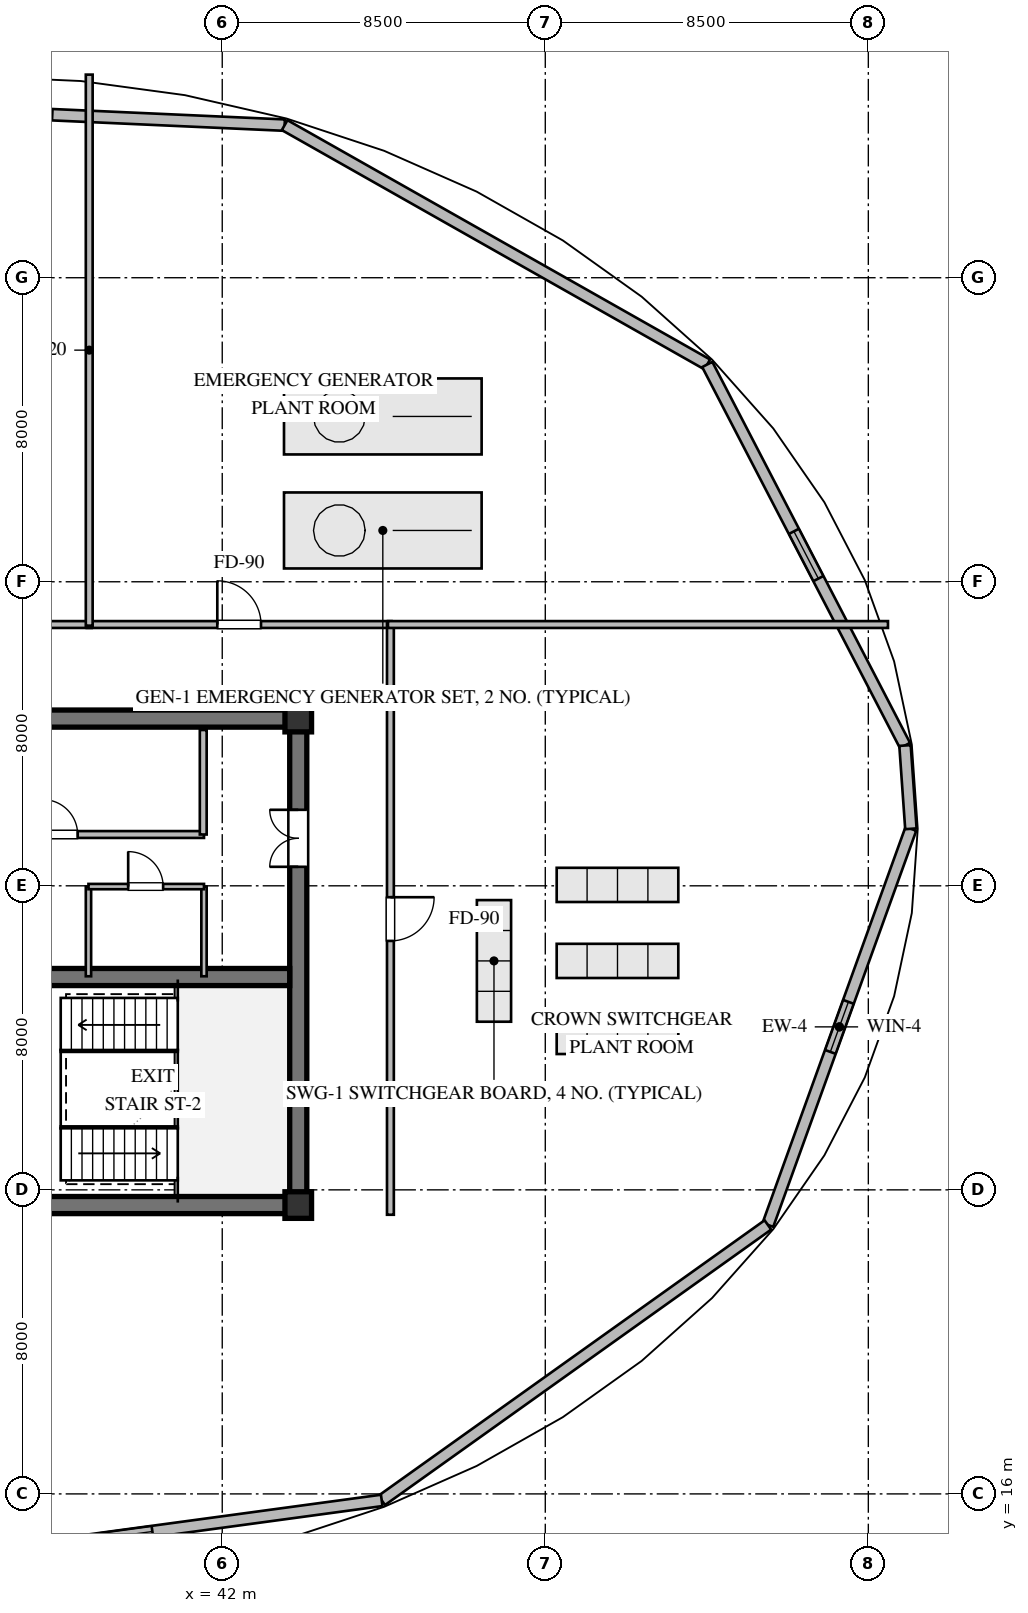
"""IFC4 building model, lengths in metres.
Left out: names, types, materials, properties, quantities, classifications, styles, units other than length and angle.
Written with IfcOpenShell. Run it as: python <this file> out.ifc"""

import sys

from ifc_helpers import new_model, si_unit, direction, frame, frame_2d, origin, origin_2d, place, context, subcontext, project, spatial, rectangle, extrude, element, fill, save


model = new_model("IFC4")
c1 = context("Model", 3, precision=1e-05, world=origin(), true_north=direction((0.0, 1.0)))
c2 = subcontext(c1, "Body", "Model", "MODEL_VIEW")
j1 = project(units=[si_unit("LENGTHUNIT", "METRE"), si_unit("PLANEANGLEUNIT", "RADIAN")], contexts=[c1])
p1 = place(None, origin())
s1 = spatial("IfcSite", under=j1, at=p1, CompositionType="ELEMENT")
p2 = place(p1, origin())
s2 = spatial("IfcBuilding", under=s1, at=p2, CompositionType="ELEMENT")
p3 = place(p2, frame((0.0, 0.0, 304.8)))
s3 = spatial("IfcBuildingStorey", under=s2, at=p3, CompositionType="ELEMENT", Elevation=304.8)
for number, where, z_axis, x_axis in (
    (1, (21.775, 23.6, 0.0), (0.0, 0.0, 1.0), (1.0, 0.0, 0.0)),
    (2, (21.775, 36.4, 0.0), (0.0, 0.0, 1.0), (1.0, 0.0, 0.0)),
):
    element("IfcWall", number, at=place(p3, frame(where, z_axis=z_axis, x_axis=x_axis)), inside=s3, PredefinedType="SHEAR", context=c2, shape_type="SweptSolid", body=[
        extrude(rectangle(XDim=22.45, YDim=0.45, at=frame_2d((11.225, 0.0))), origin(), (0.0, 0.0, 1.0), 3.72),
    ])
p4 = place(p3, frame((44.0, 23.825, 0.0), z_axis=(0.0, 0.0, 1.0), x_axis=(0.0, 1.0, 0.0)))
e3 = element("IfcWall", 3, at=p4, inside=s3, PredefinedType="SHEAR", context=c2, shape_type="SweptSolid", body=[
    extrude(rectangle(XDim=12.35, YDim=0.45, at=frame_2d((6.175, 0.0))), origin(), (0.0, 0.0, 1.0), 3.72),
])
p5 = place(p4, frame((8.675, 0.0, 0.0)))
e4 = element("IfcOpeningElement", 4, at=p5, cuts=e3, PredefinedType="OPENING", context=c2, shape_type="SweptSolid", body=[
    extrude(rectangle(XDim=1.5, YDim=2.15, at=frame_2d((0.75, 1.075))), frame((0.0, 0.235, 0.0), z_axis=(0.0, -1.0, 0.0), x_axis=(1.0, 0.0, 0.0)), (0.0, 0.0, 1.0), 0.47),
])
p6 = place(p3, frame((22.225, 29.6, 0.0), z_axis=(0.0, 0.0, 1.0), x_axis=(1.0, 0.0, 0.0)))
e5 = element("IfcWall", 5, at=p6, inside=s3, PredefinedType="SHEAR", context=c2, shape_type="SweptSolid", body=[
    extrude(rectangle(XDim=21.55, YDim=0.45, at=frame_2d((10.775, 0.0))), origin(), (0.0, 0.0, 1.0), 3.72),
])
p7 = place(p6, frame((12.225, 0.0, 0.0)))
e6 = element("IfcOpeningElement", 6, at=p7, cuts=e5, PredefinedType="OPENING", context=c2, shape_type="SweptSolid", body=[
    extrude(rectangle(XDim=1.15, YDim=2.1, at=frame_2d((0.575, 1.05))), frame((0.0, 0.235, 0.0), z_axis=(0.0, -1.0, 0.0), x_axis=(1.0, 0.0, 0.0)), (0.0, 0.0, 1.0), 0.47),
])
for number, where, z_axis, x_axis in (
    (7, (44.0, 23.6, 0.0), (0.0, 0.0, 1.0), (1.0, 0.0, 0.0)),
    (8, (44.0, 36.4, 0.0), (0.0, 0.0, 1.0), (1.0, 0.0, 0.0)),
):
    element("IfcColumn", number, at=place(p3, frame(where, z_axis=z_axis, x_axis=x_axis)), inside=s3, PredefinedType="COLUMN", context=c2, shape_type="SweptSolid", body=[
        extrude(rectangle(XDim=0.7, YDim=0.7, at=origin_2d()), origin(), (0.0, 0.0, 1.0), 4.0),
    ])
p8 = place(p3, frame((60.12, 33.5, 0.0), z_axis=(0.0, 0.0, 1.0), x_axis=(-0.339587618367, -0.940574425259, 0.0)))
e9 = element("IfcWall", 9, at=p8, inside=s3, PredefinedType="STANDARD", context=c2, shape_type="SweptSolid", body=[
    extrude(rectangle(XDim=11.082, YDim=0.3, at=frame_2d((5.541, 0.0))), origin(), (0.0, 0.0, 1.0), 3.72),
])
p9 = place(p8, frame((4.841, 0.0, 1.2)))
e10 = element("IfcOpeningElement", 10, at=p9, cuts=e9, PredefinedType="OPENING", context=c2, shape_type="SweptSolid", body=[
    extrude(rectangle(XDim=1.4, YDim=1.2, at=frame_2d((0.7, 0.6))), frame((0.0, 0.16, 0.0), z_axis=(0.0, -1.0, 0.0), x_axis=(1.0, 0.0, 0.0)), (0.0, 0.0, 1.0), 0.32),
])
p10 = place(p3, frame((56.357, 23.077, 0.0), z_axis=(0.0, 0.0, 1.0), x_axis=(-0.814111303181, -0.580708865123, 0.0)))
e11 = element("IfcWall", 11, at=p10, inside=s3, PredefinedType="STANDARD", context=c2, shape_type="SweptSolid", body=[
    extrude(rectangle(XDim=12.481, YDim=0.3, at=frame_2d((6.24, 0.0))), origin(), (0.0, 0.0, 1.0), 3.72),
])
p11 = place(p3, frame((46.196, 15.829, 0.0), z_axis=(0.0, 0.0, 1.0), x_axis=(-0.990927056791, -0.134400774248, 0.0)))
e12 = element("IfcWall", 12, at=p11, inside=s3, PredefinedType="STANDARD", context=c2, shape_type="SweptSolid", body=[
    extrude(rectangle(XDim=13.58, YDim=0.3, at=frame_2d((6.79, 0.0))), origin(), (0.0, 0.0, 1.0), 3.72),
])
p12 = place(p11, frame((6.09, 0.0, 1.2)))
e13 = element("IfcOpeningElement", 13, at=p12, cuts=e12, PredefinedType="OPENING", context=c2, shape_type="SweptSolid", body=[
    extrude(rectangle(XDim=1.4, YDim=1.2, at=frame_2d((0.7, 0.6))), frame((0.0, 0.16, 0.0), z_axis=(0.0, -1.0, 0.0), x_axis=(1.0, 0.0, 0.0)), (0.0, 0.0, 1.0), 0.32),
])
p13 = place(p3, frame((30.014, 52.626, 0.0), z_axis=(0.0, 0.0, 1.0), x_axis=(0.998996211569, -0.04479474602, 0.0)))
e14 = element("IfcWall", 14, at=p13, inside=s3, PredefinedType="STANDARD", context=c2, shape_type="SweptSolid", body=[
    extrude(rectangle(XDim=13.642, YDim=0.3, at=frame_2d((6.821, 0.0))), origin(), (0.0, 0.0, 1.0), 3.72),
])
p14 = place(p13, frame((6.121, 0.0, 1.2)))
e15 = element("IfcOpeningElement", 15, at=p14, cuts=e14, PredefinedType="OPENING", context=c2, shape_type="SweptSolid", body=[
    extrude(rectangle(XDim=1.4, YDim=1.2, at=frame_2d((0.7, 0.6))), frame((0.0, 0.16, 0.0), z_axis=(0.0, -1.0, 0.0), x_axis=(1.0, 0.0, 0.0)), (0.0, 0.0, 1.0), 0.32),
])
p15 = place(p3, frame((43.642, 52.015, 0.0), z_axis=(0.0, 0.0, 1.0), x_axis=(0.870169378253, -0.492752730232, 0.0)))
e16 = element("IfcWall", 16, at=p15, inside=s3, PredefinedType="STANDARD", context=c2, shape_type="SweptSolid", body=[
    extrude(rectangle(XDim=12.779, YDim=0.3, at=frame_2d((6.39, 0.0))), origin(), (0.0, 0.0, 1.0), 3.72),
])
p16 = place(p3, frame((54.762, 45.718, 0.0), z_axis=(0.0, 0.0, 1.0), x_axis=(0.460623742834, -0.8875954977, 0.0)))
e17 = element("IfcWall", 17, at=p16, inside=s3, PredefinedType="STANDARD", context=c2, shape_type="SweptSolid", body=[
    extrude(rectangle(XDim=11.296, YDim=0.3, at=frame_2d((5.648, 0.0))), origin(), (0.0, 0.0, 1.0), 3.72),
])
p17 = place(p16, frame((4.948, 0.0, 1.2)))
e18 = element("IfcOpeningElement", 18, at=p17, cuts=e17, PredefinedType="OPENING", context=c2, shape_type="SweptSolid", body=[
    extrude(rectangle(XDim=1.4, YDim=1.2, at=frame_2d((0.7, 0.6))), frame((0.0, 0.16, 0.0), z_axis=(0.0, -1.0, 0.0), x_axis=(1.0, 0.0, 0.0)), (0.0, 0.0, 1.0), 0.32),
])
p18 = place(p3, frame((59.965, 35.692, 0.0), z_axis=(0.0, 0.0, 1.0), x_axis=(0.070552198309, -0.997508088846, 0.0)))
e19 = element("IfcWall", 19, at=p18, inside=s3, PredefinedType="STANDARD", context=c2, shape_type="SweptSolid", body=[
    extrude(rectangle(XDim=2.197, YDim=0.3, at=frame_2d((1.099, 0.0))), origin(), (0.0, 0.0, 1.0), 3.72),
])
p19 = place(p3, frame((33.98, 33.35, 0.0), z_axis=(0.0, 0.0, 1.0), x_axis=(1.0, 0.0, 0.0)))
e20 = element("IfcWall", 20, at=p19, inside=s3, PredefinedType="PARTITIONING", context=c2, shape_type="SweptSolid", body=[
    extrude(rectangle(XDim=7.54, YDim=0.18, at=frame_2d((3.77, 0.0))), origin(), (0.0, 0.0, 1.0), 3.72),
])
p20 = place(p19, frame((3.295, 0.0, 0.0)))
e21 = element("IfcOpeningElement", 21, at=p20, cuts=e20, PredefinedType="OPENING", context=c2, shape_type="SweptSolid", body=[
    extrude(rectangle(XDim=0.92, YDim=2.1, at=frame_2d((0.46, 1.05))), frame((0.0, 0.1, 0.0), z_axis=(0.0, -1.0, 0.0), x_axis=(1.0, 0.0, 0.0)), (0.0, 0.0, 1.0), 0.2),
])
p21 = place(p3, frame((41.5, 33.35, 0.0), z_axis=(0.0, 0.0, 1.0), x_axis=(0.0, 1.0, 0.0)))
e22 = element("IfcWall", 22, at=p21, inside=s3, PredefinedType="PARTITIONING", context=c2, shape_type="SweptSolid", body=[
    extrude(rectangle(XDim=2.75, YDim=0.18, at=frame_2d((1.375, 0.0))), origin(), (0.0, 0.0, 1.0), 3.72),
])
for number, where, z_axis, x_axis in (
    (23, (38.48, 29.62, 0.0), (0.0, 0.0, 1.0), (0.0, 1.0, 0.0)),
    (24, (41.52, 29.62, 0.0), (0.0, 0.0, 1.0), (0.0, 1.0, 0.0)),
):
    element("IfcWall", number, at=place(p3, frame(where, z_axis=z_axis, x_axis=x_axis)), inside=s3, PredefinedType="PARTITIONING", context=c2, shape_type="SweptSolid", body=[
        extrude(rectangle(XDim=2.36, YDim=0.14, at=frame_2d((1.18, 0.0))), origin(), (0.0, 0.0, 1.0), 3.72),
    ])
p22 = place(p3, frame((38.48, 31.98, 0.0), z_axis=(0.0, 0.0, 1.0), x_axis=(1.0, 0.0, 0.0)))
e25 = element("IfcWall", 25, at=p22, inside=s3, PredefinedType="PARTITIONING", context=c2, shape_type="SweptSolid", body=[
    extrude(rectangle(XDim=3.04, YDim=0.14, at=frame_2d((1.52, 0.0))), origin(), (0.0, 0.0, 1.0), 3.72),
])
p23 = place(p22, frame((1.045, 0.0, 0.0)))
e26 = element("IfcOpeningElement", 26, at=p23, cuts=e25, PredefinedType="OPENING", context=c2, shape_type="SweptSolid", body=[
    extrude(rectangle(XDim=0.92, YDim=2.1, at=frame_2d((0.46, 1.05))), frame((0.0, 0.08, 0.0), z_axis=(0.0, -1.0, 0.0), x_axis=(1.0, 0.0, 0.0)), (0.0, 0.0, 1.0), 0.16),
])
p24 = place(p3, frame((21.745, 38.875, 0.0), z_axis=(0.0, 0.0, 1.0), x_axis=(1.0, 0.0, 0.0)))
e27 = element("IfcWall", 27, at=p24, inside=s3, PredefinedType="PARTITIONING", context=c2, shape_type="SweptSolid", body=[
    extrude(rectangle(XDim=16.82, YDim=0.18, at=frame_2d((8.41, 0.0))), origin(), (0.0, 0.0, 1.0), 3.72),
])
p25 = place(p24, frame((7.835, 0.0, 0.0)))
e28 = element("IfcOpeningElement", 28, at=p25, cuts=e27, PredefinedType="OPENING", context=c2, shape_type="SweptSolid", body=[
    extrude(rectangle(XDim=1.15, YDim=2.1, at=frame_2d((0.575, 1.05))), frame((0.0, 0.1, 0.0), z_axis=(0.0, -1.0, 0.0), x_axis=(1.0, 0.0, 0.0)), (0.0, 0.0, 1.0), 0.2),
])
p26 = place(p3, frame((38.435, 38.875, 0.0), z_axis=(0.0, 0.0, 1.0), x_axis=(1.0, 0.0, 0.0)))
e29 = element("IfcWall", 29, at=p26, inside=s3, PredefinedType="PARTITIONING", context=c2, shape_type="SweptSolid", body=[
    extrude(rectangle(XDim=8.02, YDim=0.18, at=frame_2d((4.01, 0.0))), origin(), (0.0, 0.0, 1.0), 3.72),
])
p27 = place(p26, frame((3.435, 0.0, 0.0)))
e30 = element("IfcOpeningElement", 30, at=p27, cuts=e29, PredefinedType="OPENING", context=c2, shape_type="SweptSolid", body=[
    extrude(rectangle(XDim=1.15, YDim=2.1, at=frame_2d((0.575, 1.05))), frame((0.0, 0.1, 0.0), z_axis=(0.0, -1.0, 0.0), x_axis=(1.0, 0.0, 0.0)), (0.0, 0.0, 1.0), 0.2),
])
p28 = place(p3, frame((46.425, 38.905, 0.0), z_axis=(0.0, 0.0, 1.0), x_axis=(0.0, -1.0, 0.0)))
e31 = element("IfcWall", 31, at=p28, inside=s3, PredefinedType="PARTITIONING", context=c2, shape_type="SweptSolid", body=[
    extrude(rectangle(XDim=15.56, YDim=0.18, at=frame_2d((7.78, 0.0))), origin(), (0.0, 0.0, 1.0), 3.72),
])
p29 = place(p28, frame((7.205, 0.0, 0.0)))
e32 = element("IfcOpeningElement", 32, at=p29, cuts=e31, PredefinedType="OPENING", context=c2, shape_type="SweptSolid", body=[
    extrude(rectangle(XDim=1.15, YDim=2.1, at=frame_2d((0.575, 1.05))), frame((0.0, 0.1, 0.0), z_axis=(0.0, -1.0, 0.0), x_axis=(1.0, 0.0, 0.0)), (0.0, 0.0, 1.0), 0.2),
])
p30 = place(p3, frame((38.5, 53.344, 0.0), z_axis=(0.0, 0.0, 1.0), x_axis=(0.0, -1.0, 0.0)))
e33 = element("IfcWall", 33, at=p30, inside=s3, PredefinedType="PARTITIONING", context=c2, shape_type="SweptSolid", body=[
    extrude(rectangle(XDim=14.499, YDim=0.18, at=frame_2d((7.25, 0.0))), origin(), (0.0, 0.0, 1.0), 3.72),
])
p31 = place(p3, frame((59.517, 38.875, 0.0), z_axis=(0.0, 0.0, 1.0), x_axis=(-1.0, 0.0, 0.0)))
e34 = element("IfcWall", 34, at=p31, inside=s3, PredefinedType="PARTITIONING", context=c2, shape_type="SweptSolid", body=[
    extrude(rectangle(XDim=13.157, YDim=0.18, at=frame_2d((6.579, 0.0))), origin(), (0.0, 0.0, 1.0), 3.72),
])
p32 = place(p9, origin())
e35 = element("IfcWindow", 35, at=p32, inside=s3, PartitioningType="SINGLE_PANEL", PredefinedType="WINDOW", context=c2, shape_type="SweptSolid", body=[
    extrude(rectangle(XDim=1.4, YDim=1.2, at=frame_2d((0.7, 0.6))), frame((0.0, 0.03, 0.0), z_axis=(0.0, -1.0, 0.0), x_axis=(1.0, 0.0, 0.0)), (0.0, 0.0, 1.0), 0.06),
])
fill(e10, e35)
p33 = place(p12, origin())
e36 = element("IfcWindow", 36, at=p33, inside=s3, PartitioningType="SINGLE_PANEL", PredefinedType="WINDOW", context=c2, shape_type="SweptSolid", body=[
    extrude(rectangle(XDim=1.4, YDim=1.2, at=frame_2d((0.7, 0.6))), frame((0.0, 0.03, 0.0), z_axis=(0.0, -1.0, 0.0), x_axis=(1.0, 0.0, 0.0)), (0.0, 0.0, 1.0), 0.06),
])
fill(e13, e36)
p34 = place(p14, origin())
e37 = element("IfcWindow", 37, at=p34, inside=s3, PartitioningType="SINGLE_PANEL", PredefinedType="WINDOW", context=c2, shape_type="SweptSolid", body=[
    extrude(rectangle(XDim=1.4, YDim=1.2, at=frame_2d((0.7, 0.6))), frame((0.0, 0.03, 0.0), z_axis=(0.0, -1.0, 0.0), x_axis=(1.0, 0.0, 0.0)), (0.0, 0.0, 1.0), 0.06),
])
fill(e15, e37)
p35 = place(p17, origin())
e38 = element("IfcWindow", 38, at=p35, inside=s3, PartitioningType="SINGLE_PANEL", PredefinedType="WINDOW", context=c2, shape_type="SweptSolid", body=[
    extrude(rectangle(XDim=1.4, YDim=1.2, at=frame_2d((0.7, 0.6))), frame((0.0, 0.03, 0.0), z_axis=(0.0, -1.0, 0.0), x_axis=(1.0, 0.0, 0.0)), (0.0, 0.0, 1.0), 0.06),
])
fill(e18, e38)
p36 = place(p5, origin())
e39 = element("IfcDoor", 39, at=p36, inside=s3, OperationType="DOUBLE_DOOR_SINGLE_SWING", PredefinedType="DOOR", context=c2, shape_type="SweptSolid", body=[
    extrude(rectangle(XDim=1.5, YDim=2.15, at=frame_2d((0.75, 1.075))), frame((0.0, 0.025, 0.0), z_axis=(0.0, -1.0, 0.0), x_axis=(1.0, 0.0, 0.0)), (0.0, 0.0, 1.0), 0.05),
])
fill(e4, e39)
p37 = place(p20, origin())
e40 = element("IfcDoor", 40, at=p37, inside=s3, OperationType="SINGLE_SWING_LEFT", PredefinedType="DOOR", context=c2, shape_type="SweptSolid", body=[
    extrude(rectangle(XDim=0.92, YDim=2.1, at=frame_2d((0.46, 1.05))), frame((0.0, 0.025, 0.0), z_axis=(0.0, -1.0, 0.0), x_axis=(1.0, 0.0, 0.0)), (0.0, 0.0, 1.0), 0.05),
])
fill(e21, e40)
p38 = place(p23, origin())
e41 = element("IfcDoor", 41, at=p38, inside=s3, OperationType="SINGLE_SWING_LEFT", PredefinedType="DOOR", context=c2, shape_type="SweptSolid", body=[
    extrude(rectangle(XDim=0.92, YDim=2.1, at=frame_2d((0.46, 1.05))), frame((0.0, 0.025, 0.0), z_axis=(0.0, -1.0, 0.0), x_axis=(1.0, 0.0, 0.0)), (0.0, 0.0, 1.0), 0.05),
])
fill(e26, e41)
p39 = place(p27, origin())
e42 = element("IfcDoor", 42, at=p39, inside=s3, OperationType="SINGLE_SWING_LEFT", PredefinedType="DOOR", context=c2, shape_type="SweptSolid", body=[
    extrude(rectangle(XDim=1.15, YDim=2.1, at=frame_2d((0.575, 1.05))), frame((0.0, 0.025, 0.0), z_axis=(0.0, -1.0, 0.0), x_axis=(1.0, 0.0, 0.0)), (0.0, 0.0, 1.0), 0.05),
])
fill(e30, e42)
p40 = place(p29, origin())
e43 = element("IfcDoor", 43, at=p40, inside=s3, OperationType="SINGLE_SWING_LEFT", PredefinedType="DOOR", context=c2, shape_type="SweptSolid", body=[
    extrude(rectangle(XDim=1.15, YDim=2.1, at=frame_2d((0.575, 1.05))), frame((0.0, 0.025, 0.0), z_axis=(0.0, -1.0, 0.0), x_axis=(1.0, 0.0, 0.0)), (0.0, 0.0, 1.0), 0.05),
])
fill(e32, e43)
save(model, sys.argv[1])
